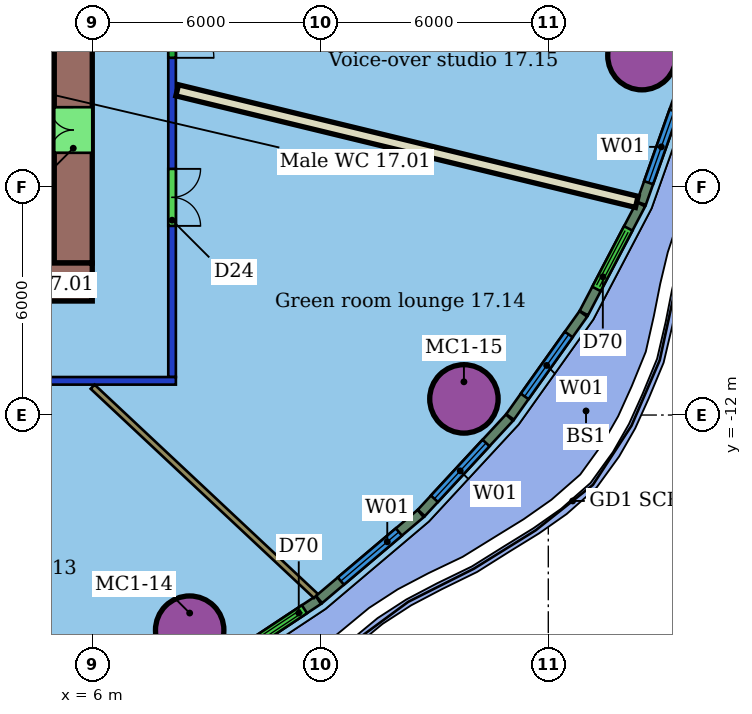
"""IFC4 building model, lengths in metres.
Left out: names, types, materials, properties, quantities, classifications, styles, units other than length and angle.
Written with IfcOpenShell. Run it as: python <this file> out.ifc"""

import sys

from ifc_helpers import new_model, si_unit, direction, frame, frame_2d, origin, origin_2d, place, context, subcontext, project, spatial, rectangle, hollow_circle, extrude, element, fill, save


model = new_model("IFC4")
c1 = context("Model", 3, precision=1e-05, world=origin(), true_north=direction((0.0, 1.0)))
c2 = subcontext(c1, "Body", "Model", "MODEL_VIEW")
j1 = project(units=[si_unit("LENGTHUNIT", "METRE"), si_unit("PLANEANGLEUNIT", "RADIAN")], contexts=[c1])
p1 = place(None, origin())
s1 = spatial("IfcSite", under=j1, at=p1, CompositionType="ELEMENT")
p2 = place(p1, origin())
s2 = spatial("IfcBuilding", under=s1, at=p2, CompositionType="ELEMENT")
p3 = place(p2, frame((0.0, 0.0, 80.4)))
s3 = spatial("IfcBuildingStorey", under=s2, at=p3, CompositionType="ELEMENT", Elevation=80.4)
for number, where, z_axis, x_axis in (
    (1, (8.563, -17.66, 0.0), (0.0, 0.0, 1.0), (1.0, 0.0, 0.0)),
    (2, (15.78, -11.576, 0.0), (0.0, 0.0, 1.0), (1.0, 0.0, 0.0)),
    (3, (20.464, -2.543, 0.0), (0.0, 0.0, 1.0), (1.0, 0.0, 0.0)),
):
    element("IfcColumn", number, at=place(p3, frame(where, z_axis=z_axis, x_axis=x_axis)), inside=s3, PredefinedType="COLUMN", context=c2, shape_type="SweptSolid", body=[
        extrude(hollow_circle(Radius=0.9, WallThickness=0.06, at=origin_2d()), origin(), (0.0, 0.0, 1.0), 3.5),
    ])
p4 = place(p3, frame((8.2, -11.1, 0.0), z_axis=(0.0, 0.0, 1.0), x_axis=(-1.0, 0.0, 0.0)))
e4 = element("IfcWall", 4, at=p4, inside=s3, PredefinedType="PARTITIONING", context=c2, shape_type="SweptSolid", body=[
    extrude(rectangle(XDim=28.4, YDim=0.2, at=frame_2d((14.2, 0.0))), origin(), (0.0, 0.0, 1.0), 2.8),
])
p5 = place(p4, frame((24.754, 0.0, 0.0)))
e5 = element("IfcOpeningElement", 5, at=p5, cuts=e4, PredefinedType="OPENING", context=c2, shape_type="SweptSolid", body=[
    extrude(rectangle(XDim=1.1, YDim=2.1, at=frame_2d((0.55, 1.05))), frame((0.0, 0.11, 0.0), z_axis=(0.0, -1.0, 0.0), x_axis=(1.0, 0.0, 0.0)), (0.0, 0.0, 1.0), 0.22),
])
p6 = place(p4, frame((19.019, 0.0, 0.0)))
e6 = element("IfcOpeningElement", 6, at=p6, cuts=e4, PredefinedType="OPENING", context=c2, shape_type="SweptSolid", body=[
    extrude(rectangle(XDim=1.0, YDim=2.1, at=frame_2d((0.5, 1.05))), frame((0.0, 0.11, 0.0), z_axis=(0.0, -1.0, 0.0), x_axis=(1.0, 0.0, 0.0)), (0.0, 0.0, 1.0), 0.22),
])
p7 = place(p4, frame((14.88, 0.0, 0.0)))
e7 = element("IfcOpeningElement", 7, at=p7, cuts=e4, PredefinedType="OPENING", context=c2, shape_type="SweptSolid", body=[
    extrude(rectangle(XDim=0.9, YDim=2.1, at=frame_2d((0.45, 1.05))), frame((0.0, 0.11, 0.0), z_axis=(0.0, -1.0, 0.0), x_axis=(1.0, 0.0, 0.0)), (0.0, 0.0, 1.0), 0.22),
])
p8 = place(p4, frame((8.217, 0.0, 0.0)))
e8 = element("IfcOpeningElement", 8, at=p8, cuts=e4, PredefinedType="OPENING", context=c2, shape_type="SweptSolid", body=[
    extrude(rectangle(XDim=0.9, YDim=2.1, at=frame_2d((0.45, 1.05))), frame((0.0, 0.11, 0.0), z_axis=(0.0, -1.0, 0.0), x_axis=(1.0, 0.0, 0.0)), (0.0, 0.0, 1.0), 0.22),
])
p9 = place(p3, frame((8.1, 11.0, 0.0), z_axis=(0.0, 0.0, 1.0), x_axis=(0.0, -1.0, 0.0)))
e9 = element("IfcWall", 9, at=p9, inside=s3, PredefinedType="PARTITIONING", context=c2, shape_type="SweptSolid", body=[
    extrude(rectangle(XDim=22.0, YDim=0.2, at=frame_2d((11.0, 0.0))), origin(), (0.0, 0.0, 1.0), 2.8),
])
p10 = place(p9, frame((5.63, 0.0, 0.0)))
e10 = element("IfcOpeningElement", 10, at=p10, cuts=e9, PredefinedType="OPENING", context=c2, shape_type="SweptSolid", body=[
    extrude(rectangle(XDim=1.0, YDim=2.1, at=frame_2d((0.5, 1.05))), frame((0.0, 0.11, 0.0), z_axis=(0.0, -1.0, 0.0), x_axis=(1.0, 0.0, 0.0)), (0.0, 0.0, 1.0), 0.22),
])
p11 = place(p9, frame((16.523, 0.0, 0.0)))
e11 = element("IfcOpeningElement", 11, at=p11, cuts=e9, PredefinedType="OPENING", context=c2, shape_type="SweptSolid", body=[
    extrude(rectangle(XDim=1.5, YDim=2.1, at=frame_2d((0.75, 1.05))), frame((0.0, 0.11, 0.0), z_axis=(0.0, -1.0, 0.0), x_axis=(1.0, 0.0, 0.0)), (0.0, 0.0, 1.0), 0.22),
])
p12 = place(p9, frame((12.501, 0.0, 0.0)))
e12 = element("IfcOpeningElement", 12, at=p12, cuts=e9, PredefinedType="OPENING", context=c2, shape_type="SweptSolid", body=[
    extrude(rectangle(XDim=1.1, YDim=2.1, at=frame_2d((0.55, 1.05))), frame((0.0, 0.11, 0.0), z_axis=(0.0, -1.0, 0.0), x_axis=(1.0, 0.0, 0.0)), (0.0, 0.0, 1.0), 0.22),
])
p13 = place(p9, frame((8.782, 0.0, 0.0)))
e13 = element("IfcOpeningElement", 13, at=p13, cuts=e9, PredefinedType="OPENING", context=c2, shape_type="SweptSolid", body=[
    extrude(rectangle(XDim=1.5, YDim=2.1, at=frame_2d((0.75, 1.05))), frame((0.0, 0.11, 0.0), z_axis=(0.0, -1.0, 0.0), x_axis=(1.0, 0.0, 0.0)), (0.0, 0.0, 1.0), 0.22),
])
p14 = place(p3, frame((11.884, -16.761, 0.0), z_axis=(0.0, 0.0, 1.0), x_axis=(-0.729643098054, 0.683828157846, 0.0)))
e14 = element("IfcWall", 14, at=p14, inside=s3, PredefinedType="PARTITIONING", context=c2, shape_type="SweptSolid", body=[
    extrude(rectangle(XDim=8.052, YDim=0.15, at=frame_2d((4.026, 0.0))), origin(), (0.0, 0.0, 1.0), 3.5),
])
p15 = place(p3, frame((20.329, -6.392, 0.0), z_axis=(0.0, 0.0, 1.0), x_axis=(-0.971774781558, 0.235910521021, 0.0)))
e15 = element("IfcWall", 15, at=p15, inside=s3, PredefinedType="PARTITIONING", context=c2, shape_type="SweptSolid", body=[
    extrude(rectangle(XDim=12.445, YDim=0.3, at=frame_2d((6.222, 0.0))), origin(), (0.0, 0.0, 1.0), 3.5),
])
p16 = place(p3, frame((8.968, -18.843, 0.0), z_axis=(0.0, 0.0, 1.0), x_axis=(0.833653527953, 0.552287783073, 0.0)))
e16 = element("IfcWall", 16, at=p16, inside=s3, PredefinedType="SOLIDWALL", context=c2, shape_type="SweptSolid", body=[
    extrude(rectangle(XDim=3.577, YDim=0.25, at=frame_2d((1.788, 0.0))), origin(), (0.0, 0.0, 1.0), 3.1),
])
p17 = place(p16, frame((1.338, 0.0, 0.0)))
e17 = element("IfcOpeningElement", 17, at=p17, cuts=e16, PredefinedType="OPENING", context=c2, shape_type="SweptSolid", body=[
    extrude(rectangle(XDim=1.8, YDim=2.4, at=frame_2d((0.9, 1.2))), frame((0.0, 0.135, 0.0), z_axis=(0.0, -1.0, 0.0), x_axis=(1.0, 0.0, 0.0)), (0.0, 0.0, 1.0), 0.27),
])
p18 = place(p3, frame((11.968, -16.854, 0.0), z_axis=(0.0, 0.0, 1.0), x_axis=(0.76352642001, 0.645776591358, 0.0)))
e18 = element("IfcWall", 18, at=p18, inside=s3, PredefinedType="SOLIDWALL", context=c2, shape_type="SweptSolid", body=[
    extrude(rectangle(XDim=3.502, YDim=0.25, at=frame_2d((1.751, 0.0))), origin(), (0.0, 0.0, 1.0), 3.1),
])
p19 = place(p18, frame((0.751, 0.0, 0.8)))
e19 = element("IfcOpeningElement", 19, at=p19, cuts=e18, PredefinedType="OPENING", context=c2, shape_type="SweptSolid", body=[
    extrude(rectangle(XDim=2.0, YDim=2.2, at=frame_2d((1.0, 1.1))), frame((0.0, 0.135, 0.0), z_axis=(0.0, -1.0, 0.0), x_axis=(1.0, 0.0, 0.0)), (0.0, 0.0, 1.0), 0.27),
])
p20 = place(p3, frame((14.658, -14.576, 0.0), z_axis=(0.0, 0.0, 1.0), x_axis=(0.679170019498, 0.733980983824, 0.0)))
e20 = element("IfcWall", 20, at=p20, inside=s3, PredefinedType="SOLIDWALL", context=c2, shape_type="SweptSolid", body=[
    extrude(rectangle(XDim=3.417, YDim=0.25, at=frame_2d((1.708, 0.0))), origin(), (0.0, 0.0, 1.0), 3.1),
])
p21 = place(p20, frame((0.508, 0.0, 0.8)))
e21 = element("IfcOpeningElement", 21, at=p21, cuts=e20, PredefinedType="OPENING", context=c2, shape_type="SweptSolid", body=[
    extrude(rectangle(XDim=2.0, YDim=2.2, at=frame_2d((1.0, 1.1))), frame((0.0, 0.135, 0.0), z_axis=(0.0, -1.0, 0.0), x_axis=(1.0, 0.0, 0.0)), (0.0, 0.0, 1.0), 0.27),
])
p22 = place(p3, frame((16.994, -12.05, 0.0), z_axis=(0.0, 0.0, 1.0), x_axis=(0.579570373791, 0.814922193724, 0.0)))
e22 = element("IfcWall", 22, at=p22, inside=s3, PredefinedType="SOLIDWALL", context=c2, shape_type="SweptSolid", body=[
    extrude(rectangle(XDim=3.326, YDim=0.25, at=frame_2d((1.663, 0.0))), origin(), (0.0, 0.0, 1.0), 3.1),
])
p23 = place(p22, frame((0.663, 0.0, 0.8)))
e23 = element("IfcOpeningElement", 23, at=p23, cuts=e22, PredefinedType="OPENING", context=c2, shape_type="SweptSolid", body=[
    extrude(rectangle(XDim=2.0, YDim=2.2, at=frame_2d((1.0, 1.1))), frame((0.0, 0.135, 0.0), z_axis=(0.0, -1.0, 0.0), x_axis=(1.0, 0.0, 0.0)), (0.0, 0.0, 1.0), 0.27),
])
p24 = place(p3, frame((18.935, -9.318, 0.0), z_axis=(0.0, 0.0, 1.0), x_axis=(0.464455263318, 0.885596583314, 0.0)))
e24 = element("IfcWall", 24, at=p24, inside=s3, PredefinedType="SOLIDWALL", context=c2, shape_type="SweptSolid", body=[
    extrude(rectangle(XDim=3.235, YDim=0.25, at=frame_2d((1.618, 0.0))), origin(), (0.0, 0.0, 1.0), 3.1),
])
p25 = place(p24, frame((0.718, 0.0, 0.0)))
e25 = element("IfcOpeningElement", 25, at=p25, cuts=e24, PredefinedType="OPENING", context=c2, shape_type="SweptSolid", body=[
    extrude(rectangle(XDim=1.8, YDim=2.4, at=frame_2d((0.9, 1.2))), frame((0.0, 0.135, 0.0), z_axis=(0.0, -1.0, 0.0), x_axis=(1.0, 0.0, 0.0)), (0.0, 0.0, 1.0), 0.27),
])
p26 = place(p3, frame((20.448, -6.43, 0.0), z_axis=(0.0, 0.0, 1.0), x_axis=(0.334132445697, 0.942526131591, 0.0)))
e26 = element("IfcWall", 26, at=p26, inside=s3, PredefinedType="SOLIDWALL", context=c2, shape_type="SweptSolid", body=[
    extrude(rectangle(XDim=3.152, YDim=0.25, at=frame_2d((1.576, 0.0))), origin(), (0.0, 0.0, 1.0), 3.1),
])
p27 = place(p26, frame((0.576, 0.0, 0.8)))
e27 = element("IfcOpeningElement", 27, at=p27, cuts=e26, PredefinedType="OPENING", context=c2, shape_type="SweptSolid", body=[
    extrude(rectangle(XDim=2.0, YDim=2.2, at=frame_2d((1.0, 1.1))), frame((0.0, 0.135, 0.0), z_axis=(0.0, -1.0, 0.0), x_axis=(1.0, 0.0, 0.0)), (0.0, 0.0, 1.0), 0.27),
])
p28 = place(p3, frame((-18.0, -8.5, 0.0), z_axis=(0.0, 0.0, 1.0), x_axis=(1.0, 0.0, 0.0)))
e28 = element("IfcWall", 28, at=p28, inside=s3, PredefinedType="SHEAR", context=c2, shape_type="SweptSolid", body=[
    extrude(rectangle(XDim=24.0, YDim=1.0, at=frame_2d((12.0, 0.0))), origin(), (0.0, 0.0, 1.0), 3.4),
])
p29 = place(p28, frame((6.0, 0.0, 0.0)))
e29 = element("IfcOpeningElement", 29, at=p29, cuts=e28, PredefinedType="OPENING", context=c2, shape_type="SweptSolid", body=[
    extrude(rectangle(XDim=1.2, YDim=2.1, at=frame_2d((0.6, 1.05))), frame((0.0, 0.51, 0.0), z_axis=(0.0, -1.0, 0.0), x_axis=(1.0, 0.0, 0.0)), (0.0, 0.0, 1.0), 1.02),
])
p30 = place(p3, frame((5.5, -8.0, 0.0), z_axis=(0.0, 0.0, 1.0), x_axis=(0.0, 1.0, 0.0)))
e30 = element("IfcWall", 30, at=p30, inside=s3, PredefinedType="SHEAR", context=c2, shape_type="SweptSolid", body=[
    extrude(rectangle(XDim=16.0, YDim=1.0, at=frame_2d((8.0, 0.0))), origin(), (0.0, 0.0, 1.0), 3.4),
])
p31 = place(p30, frame((2.9, 0.0, 0.0)))
e31 = element("IfcOpeningElement", 31, at=p31, cuts=e30, PredefinedType="OPENING", context=c2, shape_type="SweptSolid", body=[
    extrude(rectangle(XDim=1.2, YDim=2.1, at=frame_2d((0.6, 1.05))), frame((0.0, 0.51, 0.0), z_axis=(0.0, -1.0, 0.0), x_axis=(1.0, 0.0, 0.0)), (0.0, 0.0, 1.0), 1.02),
])
p32 = place(p30, frame((11.9, 0.0, 0.0)))
e32 = element("IfcOpeningElement", 32, at=p32, cuts=e30, PredefinedType="OPENING", context=c2, shape_type="SweptSolid", body=[
    extrude(rectangle(XDim=1.2, YDim=2.1, at=frame_2d((0.6, 1.05))), frame((0.0, 0.51, 0.0), z_axis=(0.0, -1.0, 0.0), x_axis=(1.0, 0.0, 0.0)), (0.0, 0.0, 1.0), 1.02),
])
p33 = place(p11, origin())
e33 = element("IfcDoor", 33, at=p33, inside=s3, OperationType="DOUBLE_DOOR_SINGLE_SWING", PredefinedType="DOOR", context=c2, shape_type="SweptSolid", body=[
    extrude(rectangle(XDim=1.5, YDim=2.1, at=frame_2d((0.75, 1.05))), frame((0.0, 0.025, 0.0), z_axis=(0.0, -1.0, 0.0), x_axis=(1.0, 0.0, 0.0)), (0.0, 0.0, 1.0), 0.05),
])
fill(e11, e33)
p34 = place(p12, origin())
e34 = element("IfcDoor", 34, at=p34, inside=s3, OperationType="SINGLE_SWING_RIGHT", PredefinedType="DOOR", context=c2, shape_type="SweptSolid", body=[
    extrude(rectangle(XDim=1.1, YDim=2.1, at=frame_2d((0.55, 1.05))), frame((0.0, 0.025, 0.0), z_axis=(0.0, -1.0, 0.0), x_axis=(1.0, 0.0, 0.0)), (0.0, 0.0, 1.0), 0.05),
])
fill(e12, e34)
p35 = place(p17, origin())
e35 = element("IfcDoor", 35, at=p35, inside=s3, OperationType="DOUBLE_DOOR_SLIDING", PredefinedType="DOOR", context=c2, shape_type="SweptSolid", body=[
    extrude(rectangle(XDim=1.8, YDim=2.4, at=frame_2d((0.9, 1.2))), frame((0.0, 0.025, 0.0), z_axis=(0.0, -1.0, 0.0), x_axis=(1.0, 0.0, 0.0)), (0.0, 0.0, 1.0), 0.05),
])
fill(e17, e35)
p36 = place(p19, origin())
e36 = element("IfcWindow", 36, at=p36, inside=s3, PartitioningType="SINGLE_PANEL", PredefinedType="WINDOW", context=c2, shape_type="SweptSolid", body=[
    extrude(rectangle(XDim=2.0, YDim=2.2, at=frame_2d((1.0, 1.1))), frame((0.0, 0.03, 0.0), z_axis=(0.0, -1.0, 0.0), x_axis=(1.0, 0.0, 0.0)), (0.0, 0.0, 1.0), 0.06),
])
fill(e19, e36)
p37 = place(p21, origin())
e37 = element("IfcWindow", 37, at=p37, inside=s3, PartitioningType="SINGLE_PANEL", PredefinedType="WINDOW", context=c2, shape_type="SweptSolid", body=[
    extrude(rectangle(XDim=2.0, YDim=2.2, at=frame_2d((1.0, 1.1))), frame((0.0, 0.03, 0.0), z_axis=(0.0, -1.0, 0.0), x_axis=(1.0, 0.0, 0.0)), (0.0, 0.0, 1.0), 0.06),
])
fill(e21, e37)
p38 = place(p23, origin())
e38 = element("IfcWindow", 38, at=p38, inside=s3, PartitioningType="SINGLE_PANEL", PredefinedType="WINDOW", context=c2, shape_type="SweptSolid", body=[
    extrude(rectangle(XDim=2.0, YDim=2.2, at=frame_2d((1.0, 1.1))), frame((0.0, 0.03, 0.0), z_axis=(0.0, -1.0, 0.0), x_axis=(1.0, 0.0, 0.0)), (0.0, 0.0, 1.0), 0.06),
])
fill(e23, e38)
p39 = place(p25, origin())
e39 = element("IfcDoor", 39, at=p39, inside=s3, OperationType="DOUBLE_DOOR_SLIDING", PredefinedType="DOOR", context=c2, shape_type="SweptSolid", body=[
    extrude(rectangle(XDim=1.8, YDim=2.4, at=frame_2d((0.9, 1.2))), frame((0.0, 0.025, 0.0), z_axis=(0.0, -1.0, 0.0), x_axis=(1.0, 0.0, 0.0)), (0.0, 0.0, 1.0), 0.05),
])
fill(e25, e39)
p40 = place(p27, origin())
e40 = element("IfcWindow", 40, at=p40, inside=s3, PartitioningType="SINGLE_PANEL", PredefinedType="WINDOW", context=c2, shape_type="SweptSolid", body=[
    extrude(rectangle(XDim=2.0, YDim=2.2, at=frame_2d((1.0, 1.1))), frame((0.0, 0.03, 0.0), z_axis=(0.0, -1.0, 0.0), x_axis=(1.0, 0.0, 0.0)), (0.0, 0.0, 1.0), 0.06),
])
fill(e27, e40)
p41 = place(p31, origin())
e41 = element("IfcDoor", 41, at=p41, inside=s3, OperationType="DOUBLE_DOOR_SINGLE_SWING", PredefinedType="NOTDEFINED", context=c2, shape_type="SweptSolid", body=[
    extrude(rectangle(XDim=1.2, YDim=2.1, at=frame_2d((0.6, 1.05))), frame((0.0, 0.025, 0.0), z_axis=(0.0, -1.0, 0.0), x_axis=(1.0, 0.0, 0.0)), (0.0, 0.0, 1.0), 0.05),
])
fill(e31, e41)
save(model, sys.argv[1])
